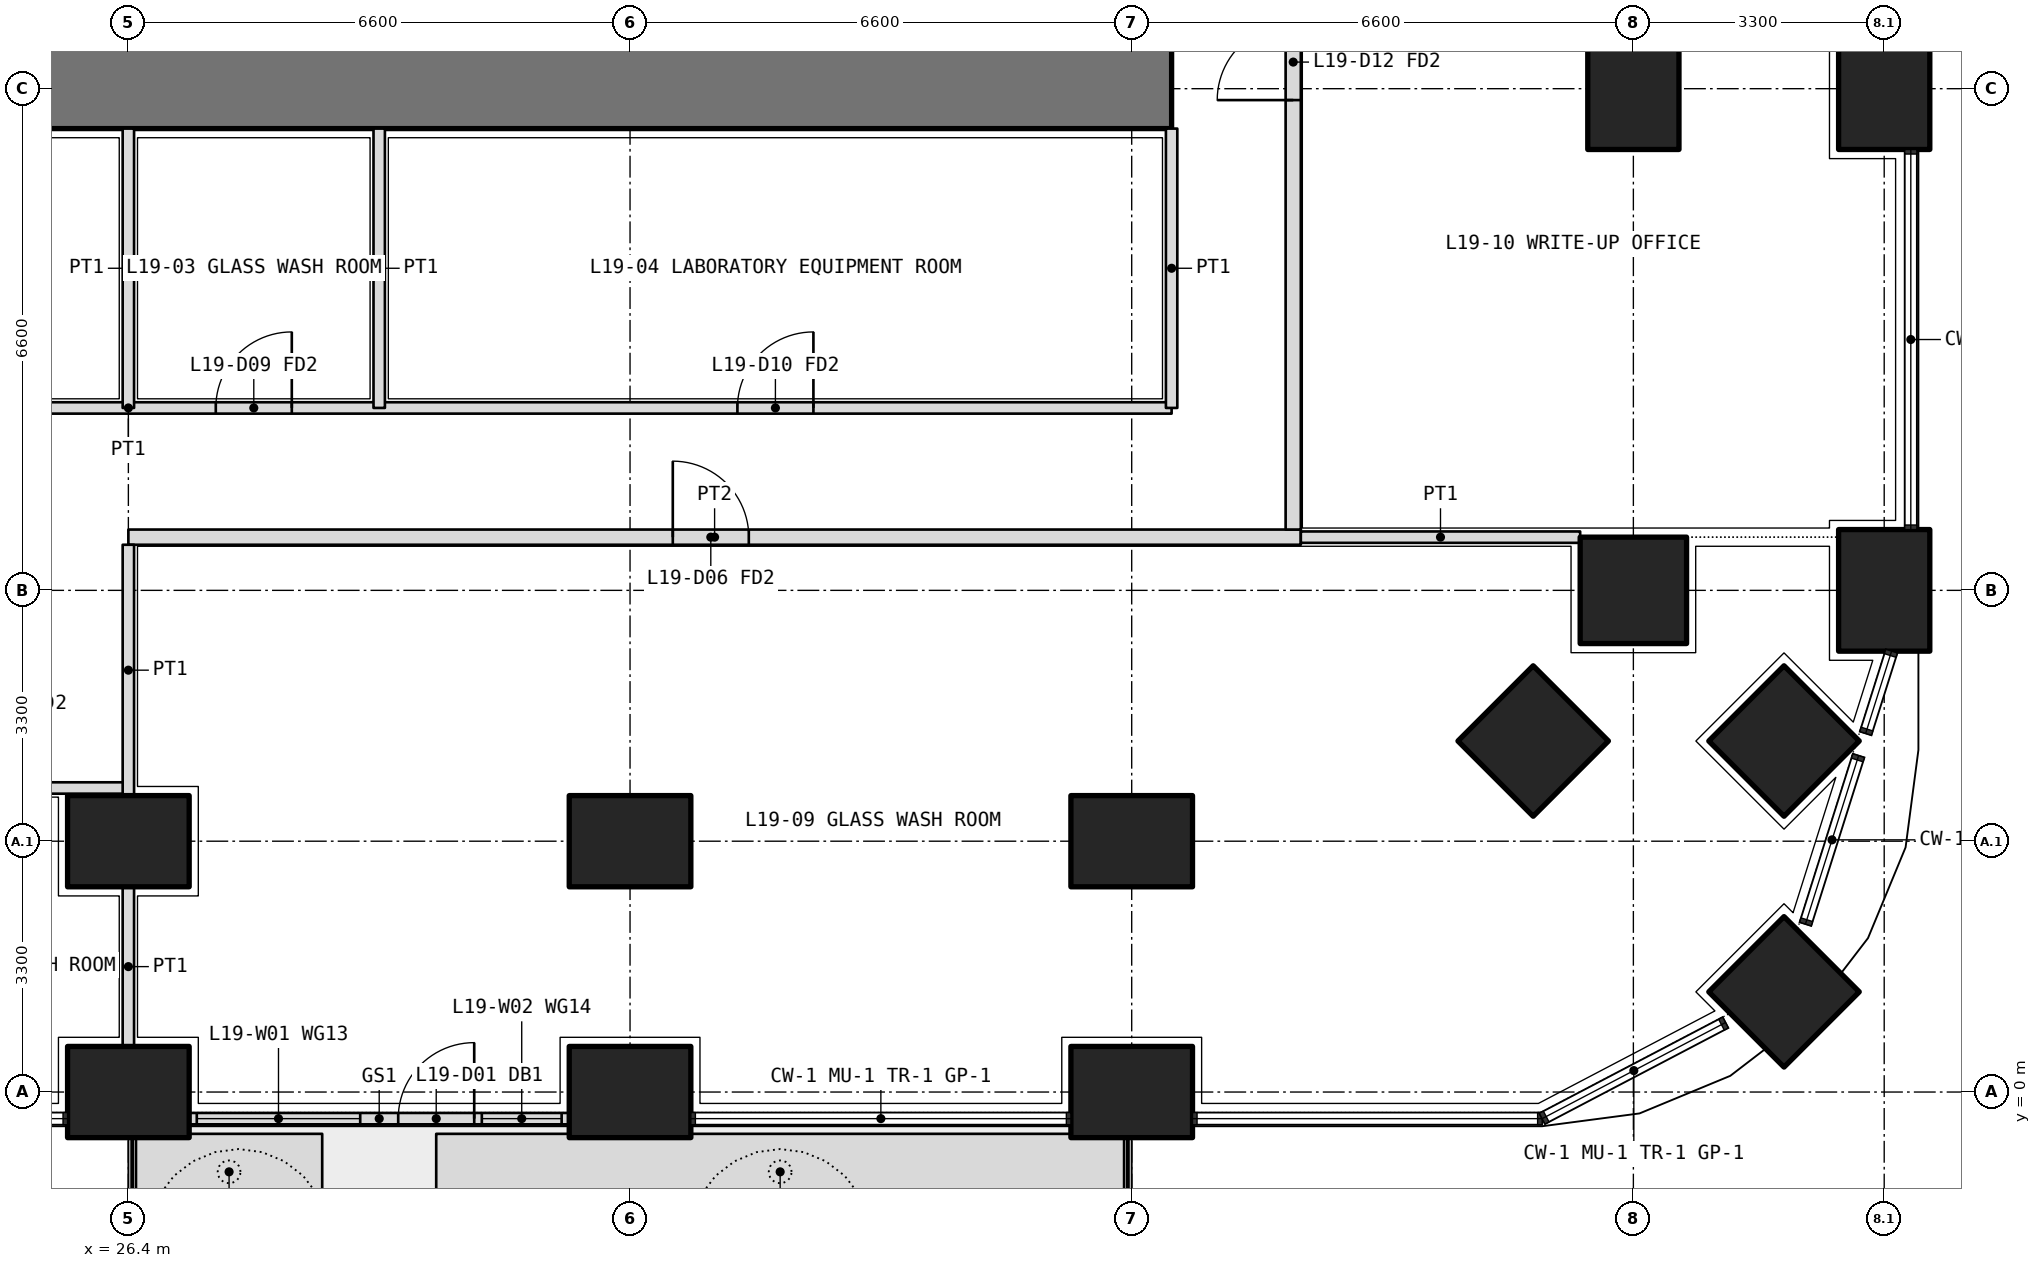
"""IFC4 building model, lengths in metres.
Left out: names, types, materials, properties, quantities, classifications, styles, units other than length and angle.
Written with IfcOpenShell. Run it as: python <this file> out.ifc"""

import sys

from ifc_helpers import new_model, si_unit, direction, frame, frame_2d, origin, origin_2d, place, context, subcontext, project, spatial, polyline, rectangle, outline, extrude, element, fill, save


model = new_model("IFC4")
c1 = context("Model", 3, precision=1e-05, world=origin(), true_north=direction((0.0, 1.0)))
c2 = subcontext(c1, "Body", "Model", "MODEL_VIEW")
j1 = project(units=[si_unit("LENGTHUNIT", "METRE"), si_unit("PLANEANGLEUNIT", "RADIAN")], contexts=[c1])
p1 = place(None, origin())
s1 = spatial("IfcSite", under=j1, at=p1, CompositionType="ELEMENT")
p2 = place(p1, origin())
s2 = spatial("IfcBuilding", under=s1, at=p2, CompositionType="ELEMENT")
p3 = place(p2, frame((0.0, 0.0, 86.4)))
s3 = spatial("IfcBuildingStorey", under=s2, at=p3, CompositionType="ELEMENT", Elevation=86.4)
p4 = place(p3, frame((48.182, 1.318, 0.0), z_axis=(0.0, 0.0, 1.0), x_axis=(0.707106781187, 0.707106781187, 0.0)))
e1 = element("IfcColumn", 1, at=p4, inside=s3, PredefinedType="COLUMN", context=c2, shape_type="SweptSolid", body=[
    extrude(rectangle(XDim=1.4, YDim=1.4, at=origin_2d()), origin(), (0.0, 0.0, 1.0), 4.2),
])
for number, where, z_axis, x_axis in (
    (2, (26.4, 0.0, 0.0), (0.0, 0.0, 1.0), (1.0, 0.0, 0.0)),
    (3, (33.0, 0.0, 0.0), (0.0, 0.0, 1.0), (1.0, 0.0, 0.0)),
    (4, (39.6, 0.0, 0.0), (0.0, 0.0, 1.0), (1.0, 0.0, 0.0)),
    (5, (49.5, 6.6, 0.0), (0.0, 0.0, 1.0), (0.0, 1.0, 0.0)),
    (6, (49.5, 13.2, 0.0), (0.0, 0.0, 1.0), (0.0, 1.0, 0.0)),
):
    element("IfcColumn", number, at=place(p3, frame(where, z_axis=z_axis, x_axis=x_axis)), inside=s3, PredefinedType="COLUMN", context=c2, shape_type="SweptSolid", body=[
        extrude(rectangle(XDim=1.6, YDim=1.2, at=origin_2d()), origin(), (0.0, 0.0, 1.0), 4.2),
    ])
for number, where, z_axis, x_axis in (
    (7, (46.2, 6.6, 0.0), (0.0, 0.0, 1.0), (1.0, 0.0, 0.0)),
    (8, (48.182, 4.618, 0.0), (0.0, 0.0, 1.0), (0.707, 0.707, 0.0)),
):
    element("IfcColumn", number, at=place(p3, frame(where, z_axis=z_axis, x_axis=x_axis)), inside=s3, PredefinedType="COLUMN", context=c2, shape_type="SweptSolid", body=[
        extrude(rectangle(XDim=1.4, YDim=1.4, at=origin_2d()), origin(), (0.0, 0.0, 1.0), 4.2),
    ])
for number, where, z_axis, x_axis in (
    (9, (26.4, 3.3, 0.0), (0.0, 0.0, 1.0), (1.0, 0.0, 0.0)),
    (10, (33.0, 3.3, 0.0), (0.0, 0.0, 1.0), (1.0, 0.0, 0.0)),
    (11, (39.6, 3.3, 0.0), (0.0, 0.0, 1.0), (1.0, 0.0, 0.0)),
):
    element("IfcColumn", number, at=place(p3, frame(where, z_axis=z_axis, x_axis=x_axis)), inside=s3, PredefinedType="COLUMN", context=c2, shape_type="SweptSolid", body=[
        extrude(rectangle(XDim=1.6, YDim=1.2, at=origin_2d()), origin(), (0.0, 0.0, 1.0), 4.2),
    ])
p5 = place(p3, frame((44.882, 4.618, 0.0), z_axis=(0.0, 0.0, 1.0), x_axis=(0.707106781187, 0.707106781187, 0.0)))
e12 = element("IfcColumn", 12, at=p5, inside=s3, PredefinedType="COLUMN", context=c2, shape_type="SweptSolid", body=[
    extrude(rectangle(XDim=1.4, YDim=1.4, at=origin_2d()), origin(), (0.0, 0.0, 1.0), 4.2),
])
p6 = place(p3, frame((46.2, 13.2, 0.0), z_axis=(0.0, 0.0, 1.0), x_axis=(0.0, 1.0, 0.0)))
e13 = element("IfcColumn", 13, at=p6, inside=s3, PredefinedType="COLUMN", context=c2, shape_type="SweptSolid", body=[
    extrude(rectangle(XDim=1.6, YDim=1.2, at=origin_2d()), origin(), (0.0, 0.0, 1.0), 4.2),
])
p7 = place(p3, origin())
e14 = element("IfcWall", 14, at=p7, inside=s3, PredefinedType="USERDEFINED", context=c2, shape_type="SweptSolid", body=[
    extrude(outline(polyline([(26.5, -1.55), (28.95, -1.55), (28.95, -0.55), (26.5, -0.55), (26.5, -1.55)]), holes=[polyline([(26.65, -1.4), (28.8, -1.4), (28.8, -0.7), (26.65, -0.7), (26.65, -1.4)])]), origin(), (0.0, 0.0, 1.0), 1.05),
])
p8 = place(p3, origin())
e15 = element("IfcWall", 15, at=p8, inside=s3, PredefinedType="USERDEFINED", context=c2, shape_type="SweptSolid", body=[
    extrude(outline(polyline([(30.45, -1.55), (39.5, -1.55), (39.5, -0.55), (30.45, -0.55), (30.45, -1.55)]), holes=[polyline([(30.6, -1.4), (39.35, -1.4), (39.35, -0.7), (30.6, -0.7), (30.6, -1.4)])]), origin(), (0.0, 0.0, 1.0), 1.05),
])
p9 = place(p3, frame((27.2, -0.35, 0.0), z_axis=(0.0, 0.0, 1.0), x_axis=(1.0, 0.0, 0.0)))
e16 = element("IfcWall", 16, at=p9, inside=s3, PredefinedType="SOLIDWALL", context=c2, shape_type="SweptSolid", body=[
    extrude(rectangle(XDim=5.0, YDim=0.15, at=frame_2d((2.5, 0.0))), origin(), (0.0, 0.0, 1.0), 2.7),
])
p10 = place(p9, frame((2.75, 0.0, 0.0)))
e17 = element("IfcOpeningElement", 17, at=p10, cuts=e16, PredefinedType="OPENING", context=c2, shape_type="SweptSolid", body=[
    extrude(rectangle(XDim=1.0, YDim=2.4, at=frame_2d((0.5, 1.2))), frame((0.0, 0.085, 0.0), z_axis=(0.0, -1.0, 0.0), x_axis=(1.0, 0.0, 0.0)), (0.0, 0.0, 1.0), 0.17),
])
p11 = place(p9, frame((0.1, 0.0, 0.1)))
e18 = element("IfcOpeningElement", 18, at=p11, cuts=e16, PredefinedType="OPENING", context=c2, shape_type="SweptSolid", body=[
    extrude(rectangle(XDim=2.15, YDim=2.3, at=frame_2d((1.075, 1.15))), frame((0.0, 0.085, 0.0), z_axis=(0.0, -1.0, 0.0), x_axis=(1.0, 0.0, 0.0)), (0.0, 0.0, 1.0), 0.17),
])
p12 = place(p9, frame((3.85, 0.0, 0.1)))
e19 = element("IfcOpeningElement", 19, at=p12, cuts=e16, PredefinedType="OPENING", context=c2, shape_type="SweptSolid", body=[
    extrude(rectangle(XDim=1.05, YDim=2.3, at=frame_2d((0.525, 1.15))), frame((0.0, 0.085, 0.0), z_axis=(0.0, -1.0, 0.0), x_axis=(1.0, 0.0, 0.0)), (0.0, 0.0, 1.0), 0.17),
])
p13 = place(p3, frame((12.675, 13.2, 0.0), z_axis=(0.0, 0.0, 1.0), x_axis=(1.0, 0.0, 0.0)))
e20 = element("IfcWall", 20, at=p13, inside=s3, PredefinedType="SHEAR", context=c2, shape_type="SweptSolid", body=[
    extrude(rectangle(XDim=27.45, YDim=1.05, at=frame_2d((13.725, 0.0))), origin(), (0.0, 0.0, 1.0), 4.2),
])
p14 = place(p3, frame((12.675, 9.0, 0.0), z_axis=(0.0, 0.0, 1.0), x_axis=(1.0, 0.0, 0.0)))
e21 = element("IfcWall", 21, at=p14, inside=s3, PredefinedType="PARTITIONING", context=c2, shape_type="SweptSolid", body=[
    extrude(rectangle(XDim=27.45, YDim=0.15, at=frame_2d((13.725, 0.0))), origin(), (0.0, 0.0, 1.0), 2.85),
])
p15 = place(p14, frame((1.413, 0.0, 0.0)))
e22 = element("IfcOpeningElement", 22, at=p15, cuts=e21, PredefinedType="OPENING", context=c2, shape_type="SweptSolid", body=[
    extrude(rectangle(XDim=1.0, YDim=2.1, at=frame_2d((0.5, 1.05))), frame((0.0, 0.085, 0.0), z_axis=(0.0, -1.0, 0.0), x_axis=(1.0, 0.0, 0.0)), (0.0, 0.0, 1.0), 0.17),
])
p16 = place(p14, frame((8.275, 0.0, 0.0)))
e23 = element("IfcOpeningElement", 23, at=p16, cuts=e21, PredefinedType="OPENING", context=c2, shape_type="SweptSolid", body=[
    extrude(rectangle(XDim=1.0, YDim=2.1, at=frame_2d((0.5, 1.05))), frame((0.0, 0.085, 0.0), z_axis=(0.0, -1.0, 0.0), x_axis=(1.0, 0.0, 0.0)), (0.0, 0.0, 1.0), 0.17),
])
p17 = place(p14, frame((14.875, 0.0, 0.0)))
e24 = element("IfcOpeningElement", 24, at=p17, cuts=e21, PredefinedType="OPENING", context=c2, shape_type="SweptSolid", body=[
    extrude(rectangle(XDim=1.0, YDim=2.1, at=frame_2d((0.5, 1.05))), frame((0.0, 0.085, 0.0), z_axis=(0.0, -1.0, 0.0), x_axis=(1.0, 0.0, 0.0)), (0.0, 0.0, 1.0), 0.17),
])
p18 = place(p14, frame((21.738, 0.0, 0.0)))
e25 = element("IfcOpeningElement", 25, at=p18, cuts=e21, PredefinedType="OPENING", context=c2, shape_type="SweptSolid", body=[
    extrude(rectangle(XDim=1.0, YDim=2.1, at=frame_2d((0.5, 1.05))), frame((0.0, 0.085, 0.0), z_axis=(0.0, -1.0, 0.0), x_axis=(1.0, 0.0, 0.0)), (0.0, 0.0, 1.0), 0.17),
])
for number, where, z_axis, x_axis in (
    (26, (40.125, 12.675, 0.0), (0.0, 0.0, 1.0), (0.0, -1.0, 0.0)),
    (27, (26.4, 12.675, 0.0), (0.0, 0.0, 1.0), (0.0, -1.0, 0.0)),
):
    element("IfcWall", number, at=place(p3, frame(where, z_axis=z_axis, x_axis=x_axis)), inside=s3, PredefinedType="PARTITIONING", context=c2, shape_type="SweptSolid", body=[
        extrude(rectangle(XDim=3.675, YDim=0.15, at=frame_2d((1.837, 0.0))), origin(), (0.0, 0.0, 1.0), 2.85),
    ])
p19 = place(p3, frame((29.7, 12.675, 0.0), z_axis=(0.0, 0.0, 1.0), x_axis=(0.0, -1.0, 0.0)))
e28 = element("IfcWall", 28, at=p19, inside=s3, PredefinedType="PARTITIONING", context=c2, shape_type="SweptSolid", body=[
    extrude(rectangle(XDim=3.675, YDim=0.15, at=frame_2d((1.837, 0.0))), origin(), (0.0, 0.0, 1.0), 3.9),
])
p20 = place(p3, frame((26.4, 7.3, 0.0), z_axis=(0.0, 0.0, 1.0), x_axis=(1.0, 0.0, 0.0)))
e29 = element("IfcWall", 29, at=p20, inside=s3, PredefinedType="PARTITIONING", context=c2, shape_type="SweptSolid", body=[
    extrude(rectangle(XDim=15.425, YDim=0.2, at=frame_2d((7.712, 0.0))), origin(), (0.0, 0.0, 1.0), 2.85),
])
p21 = place(p20, frame((7.163, 0.0, 0.0)))
e30 = element("IfcOpeningElement", 30, at=p21, cuts=e29, PredefinedType="OPENING", context=c2, shape_type="SweptSolid", body=[
    extrude(rectangle(XDim=1.0, YDim=2.1, at=frame_2d((0.5, 1.05))), frame((0.0, 0.11, 0.0), z_axis=(0.0, -1.0, 0.0), x_axis=(1.0, 0.0, 0.0)), (0.0, 0.0, 1.0), 0.22),
])
p22 = place(p3, frame((41.725, 7.4, 0.0), z_axis=(0.0, 0.0, 1.0), x_axis=(0.0, 1.0, 0.0)))
e31 = element("IfcWall", 31, at=p22, inside=s3, PredefinedType="PARTITIONING", context=c2, shape_type="SweptSolid", body=[
    extrude(rectangle(XDim=27.625, YDim=0.2, at=frame_2d((13.812, 0.0))), origin(), (0.0, 0.0, 1.0), 2.85),
])
p23 = place(p22, frame((5.65, 0.0, 0.0)))
e32 = element("IfcOpeningElement", 32, at=p23, cuts=e31, PredefinedType="OPENING", context=c2, shape_type="SweptSolid", body=[
    extrude(rectangle(XDim=1.0, YDim=2.1, at=frame_2d((0.5, 1.05))), frame((0.0, 0.11, 0.0), z_axis=(0.0, -1.0, 0.0), x_axis=(1.0, 0.0, 0.0)), (0.0, 0.0, 1.0), 0.22),
])
p24 = place(p22, frame((13.5, 0.0, 0.0)))
e33 = element("IfcOpeningElement", 33, at=p24, cuts=e31, PredefinedType="OPENING", context=c2, shape_type="SweptSolid", body=[
    extrude(rectangle(XDim=1.0, YDim=2.1, at=frame_2d((0.5, 1.05))), frame((0.0, 0.11, 0.0), z_axis=(0.0, -1.0, 0.0), x_axis=(1.0, 0.0, 0.0)), (0.0, 0.0, 1.0), 0.22),
])
p25 = place(p22, frame((16.85, 0.0, 0.0)))
e34 = element("IfcOpeningElement", 34, at=p25, cuts=e31, PredefinedType="OPENING", context=c2, shape_type="SweptSolid", body=[
    extrude(rectangle(XDim=0.9, YDim=2.1, at=frame_2d((0.45, 1.05))), frame((0.0, 0.11, 0.0), z_axis=(0.0, -1.0, 0.0), x_axis=(1.0, 0.0, 0.0)), (0.0, 0.0, 1.0), 0.22),
])
p26 = place(p22, frame((21.8, 0.0, 0.0)))
e35 = element("IfcOpeningElement", 35, at=p26, cuts=e31, PredefinedType="OPENING", context=c2, shape_type="SweptSolid", body=[
    extrude(rectangle(XDim=1.0, YDim=2.1, at=frame_2d((0.5, 1.05))), frame((0.0, 0.11, 0.0), z_axis=(0.0, -1.0, 0.0), x_axis=(1.0, 0.0, 0.0)), (0.0, 0.0, 1.0), 0.22),
])
p27 = place(p22, frame((26.163, 0.0, 0.0)))
e36 = element("IfcOpeningElement", 36, at=p27, cuts=e31, PredefinedType="OPENING", context=c2, shape_type="SweptSolid", body=[
    extrude(rectangle(XDim=1.0, YDim=2.1, at=frame_2d((0.5, 1.05))), frame((0.0, 0.11, 0.0), z_axis=(0.0, -1.0, 0.0), x_axis=(1.0, 0.0, 0.0)), (0.0, 0.0, 1.0), 0.22),
])
p28 = place(p3, frame((45.5, 7.3, 0.0), z_axis=(0.0, 0.0, 1.0), x_axis=(-1.0, 0.0, 0.0)))
e37 = element("IfcWall", 37, at=p28, inside=s3, PredefinedType="PARTITIONING", context=c2, shape_type="SweptSolid", body=[
    extrude(rectangle(XDim=3.675, YDim=0.15, at=frame_2d((1.837, 0.0))), origin(), (0.0, 0.0, 1.0), 2.85),
])
p29 = place(p3, frame((23.1, 4.0, 0.0), z_axis=(0.0, 0.0, 1.0), x_axis=(1.0, 0.0, 0.0)))
e38 = element("IfcWall", 38, at=p29, inside=s3, PredefinedType="PARTITIONING", context=c2, shape_type="SweptSolid", body=[
    extrude(rectangle(XDim=3.3, YDim=0.15, at=frame_2d((1.65, 0.0))), origin(), (0.0, 0.0, 1.0), 2.85),
])
p30 = place(p29, frame((1.15, 0.0, 0.0)))
e39 = element("IfcOpeningElement", 39, at=p30, cuts=e38, PredefinedType="OPENING", context=c2, shape_type="SweptSolid", body=[
    extrude(rectangle(XDim=1.0, YDim=2.1, at=frame_2d((0.5, 1.05))), frame((0.0, 0.085, 0.0), z_axis=(0.0, -1.0, 0.0), x_axis=(1.0, 0.0, 0.0)), (0.0, 0.0, 1.0), 0.17),
])
p31 = place(p3, frame((26.4, 0.6, 0.0), z_axis=(0.0, 0.0, 1.0), x_axis=(0.0, 1.0, 0.0)))
e40 = element("IfcWall", 40, at=p31, inside=s3, PredefinedType="PARTITIONING", context=c2, shape_type="SweptSolid", body=[
    extrude(rectangle(XDim=2.1, YDim=0.15, at=frame_2d((1.05, 0.0))), origin(), (0.0, 0.0, 1.0), 2.85),
])
p32 = place(p3, frame((26.4, 3.9, 0.0), z_axis=(0.0, 0.0, 1.0), x_axis=(0.0, 1.0, 0.0)))
e41 = element("IfcWall", 41, at=p32, inside=s3, PredefinedType="PARTITIONING", context=c2, shape_type="SweptSolid", body=[
    extrude(rectangle(XDim=3.3, YDim=0.15, at=frame_2d((1.65, 0.0))), origin(), (0.0, 0.0, 1.0), 2.85),
])
p33 = place(p10, origin())
e42 = element("IfcDoor", 42, at=p33, inside=s3, OperationType="SINGLE_SWING_RIGHT", PredefinedType="DOOR", context=c2, shape_type="SweptSolid", body=[
    extrude(rectangle(XDim=1.0, YDim=2.4, at=frame_2d((0.5, 1.2))), frame((0.0, 0.025, 0.0), z_axis=(0.0, -1.0, 0.0), x_axis=(1.0, 0.0, 0.0)), (0.0, 0.0, 1.0), 0.05),
])
fill(e17, e42)
p34 = place(p11, origin())
e43 = element("IfcWindow", 43, at=p34, inside=s3, PartitioningType="SINGLE_PANEL", PredefinedType="WINDOW", context=c2, shape_type="SweptSolid", body=[
    extrude(rectangle(XDim=2.15, YDim=2.3, at=frame_2d((1.075, 1.15))), frame((0.0, 0.03, 0.0), z_axis=(0.0, -1.0, 0.0), x_axis=(1.0, 0.0, 0.0)), (0.0, 0.0, 1.0), 0.06),
])
fill(e18, e43)
p35 = place(p12, origin())
e44 = element("IfcWindow", 44, at=p35, inside=s3, PartitioningType="SINGLE_PANEL", PredefinedType="WINDOW", context=c2, shape_type="SweptSolid", body=[
    extrude(rectangle(XDim=1.05, YDim=2.3, at=frame_2d((0.525, 1.15))), frame((0.0, 0.03, 0.0), z_axis=(0.0, -1.0, 0.0), x_axis=(1.0, 0.0, 0.0)), (0.0, 0.0, 1.0), 0.06),
])
fill(e19, e44)
p36 = place(p17, origin())
e45 = element("IfcDoor", 45, at=p36, inside=s3, OperationType="SINGLE_SWING_RIGHT", PredefinedType="DOOR", context=c2, shape_type="SweptSolid", body=[
    extrude(rectangle(XDim=1.0, YDim=2.1, at=frame_2d((0.5, 1.05))), frame((0.0, 0.025, 0.0), z_axis=(0.0, -1.0, 0.0), x_axis=(1.0, 0.0, 0.0)), (0.0, 0.0, 1.0), 0.05),
])
fill(e24, e45)
p37 = place(p18, origin())
e46 = element("IfcDoor", 46, at=p37, inside=s3, OperationType="SINGLE_SWING_RIGHT", PredefinedType="DOOR", context=c2, shape_type="SweptSolid", body=[
    extrude(rectangle(XDim=1.0, YDim=2.1, at=frame_2d((0.5, 1.05))), frame((0.0, 0.025, 0.0), z_axis=(0.0, -1.0, 0.0), x_axis=(1.0, 0.0, 0.0)), (0.0, 0.0, 1.0), 0.05),
])
fill(e25, e46)
p38 = place(p21, origin())
e47 = element("IfcDoor", 47, at=p38, inside=s3, OperationType="SINGLE_SWING_LEFT", PredefinedType="DOOR", context=c2, shape_type="SweptSolid", body=[
    extrude(rectangle(XDim=1.0, YDim=2.1, at=frame_2d((0.5, 1.05))), frame((0.0, 0.025, 0.0), z_axis=(0.0, -1.0, 0.0), x_axis=(1.0, 0.0, 0.0)), (0.0, 0.0, 1.0), 0.05),
])
fill(e30, e47)
p39 = place(p23, origin())
e48 = element("IfcDoor", 48, at=p39, inside=s3, OperationType="SINGLE_SWING_LEFT", PredefinedType="DOOR", context=c2, shape_type="SweptSolid", body=[
    extrude(rectangle(XDim=1.0, YDim=2.1, at=frame_2d((0.5, 1.05))), frame((0.0, 0.025, 0.0), z_axis=(0.0, -1.0, 0.0), x_axis=(1.0, 0.0, 0.0)), (0.0, 0.0, 1.0), 0.05),
])
fill(e32, e48)
save(model, sys.argv[1])
